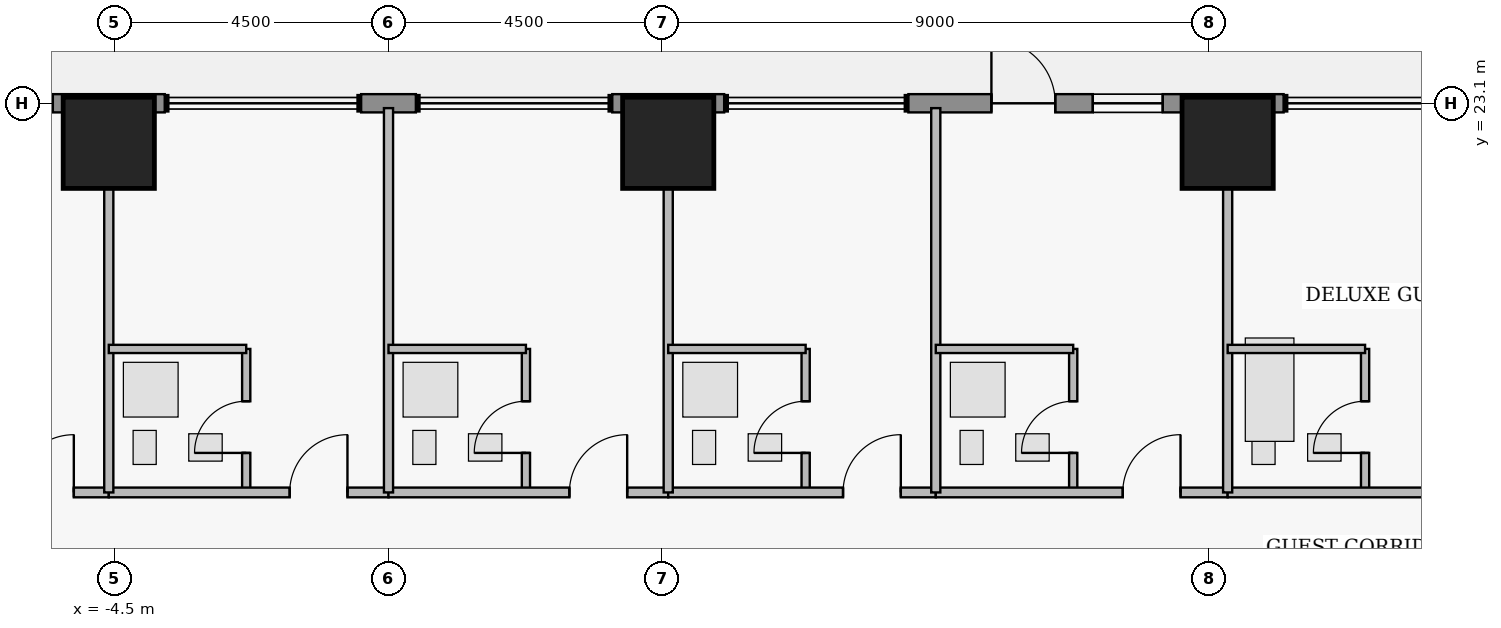
"""IFC4 building model, lengths in metres.
Left out: names, types, materials, properties, quantities, classifications, styles, units other than length and angle.
Written with IfcOpenShell. Run it as: python <this file> out.ifc"""

import sys

from ifc_helpers import new_model, si_unit, direction, frame, frame_2d, origin, origin_2d, place, context, subcontext, project, spatial, rectangle, extrude, element, fill, save


model = new_model("IFC4")
c1 = context("Model", 3, precision=1e-05, world=origin(), true_north=direction((0.0, 1.0)))
c2 = subcontext(c1, "Body", "Model", "MODEL_VIEW")
j1 = project(units=[si_unit("LENGTHUNIT", "METRE"), si_unit("PLANEANGLEUNIT", "RADIAN")], contexts=[c1])
p1 = place(None, origin())
s1 = spatial("IfcSite", under=j1, at=p1, CompositionType="ELEMENT")
p2 = place(p1, origin())
s2 = spatial("IfcBuilding", under=s1, at=p2, CompositionType="ELEMENT")
p3 = place(p2, frame((0.0, 0.0, 60.45)))
s3 = spatial("IfcBuildingStorey", under=s2, at=p3, CompositionType="ELEMENT", Elevation=60.45)
for number, where, z_axis, x_axis in (
    (1, (-4.6, 22.45, 0.0), (0.0, 0.0, 1.0), (1.0, 0.0, 0.0)),
    (2, (4.6, 22.45, 0.0), (0.0, 0.0, 1.0), (1.0, 0.0, 0.0)),
    (3, (13.8, 22.45, 0.0), (0.0, 0.0, 1.0), (1.0, 0.0, 0.0)),
):
    element("IfcColumn", number, at=place(p3, frame(where, z_axis=z_axis, x_axis=x_axis)), inside=s3, PredefinedType="COLUMN", context=c2, shape_type="SweptSolid", body=[
        extrude(rectangle(XDim=1.5, YDim=1.5, at=origin_2d()), origin(), (0.0, 0.0, 1.0), 3.65),
    ])
p4 = place(p3, frame((-5.52, 23.1, 0.0), z_axis=(0.0, 0.0, 1.0), x_axis=(1.0, 0.0, 0.0)))
e4 = element("IfcWall", 4, at=p4, inside=s3, PredefinedType="STANDARD", context=c2, shape_type="SweptSolid", body=[
    extrude(rectangle(XDim=1.84, YDim=0.3, at=frame_2d((0.92, 0.0))), origin(), (0.0, 0.0, 1.0), 3.43),
])
p5 = place(p3, frame((-0.45, 23.1, 0.0), z_axis=(0.0, 0.0, 1.0), x_axis=(1.0, 0.0, 0.0)))
e5 = element("IfcWall", 5, at=p5, inside=s3, PredefinedType="STANDARD", context=c2, shape_type="SweptSolid", body=[
    extrude(rectangle(XDim=0.9, YDim=0.3, at=frame_2d((0.45, 0.0))), origin(), (0.0, 0.0, 1.0), 3.43),
])
p6 = place(p3, frame((3.68, 23.1, 0.0), z_axis=(0.0, 0.0, 1.0), x_axis=(1.0, 0.0, 0.0)))
e6 = element("IfcWall", 6, at=p6, inside=s3, PredefinedType="STANDARD", context=c2, shape_type="SweptSolid", body=[
    extrude(rectangle(XDim=1.84, YDim=0.3, at=frame_2d((0.92, 0.0))), origin(), (0.0, 0.0, 1.0), 3.43),
])
p7 = place(p3, frame((8.55, 23.1, 0.0), z_axis=(0.0, 0.0, 1.0), x_axis=(1.0, 0.0, 0.0)))
e7 = element("IfcWall", 7, at=p7, inside=s3, PredefinedType="STANDARD", context=c2, shape_type="SweptSolid", body=[
    extrude(rectangle(XDim=6.17, YDim=0.3, at=frame_2d((3.085, 0.0))), origin(), (0.0, 0.0, 1.0), 3.43),
])
p8 = place(p7, frame((1.365, 0.0, 0.0)))
e8 = element("IfcOpeningElement", 8, at=p8, cuts=e7, PredefinedType="OPENING", context=c2, shape_type="SweptSolid", body=[
    extrude(rectangle(XDim=1.05, YDim=2.2, at=frame_2d((0.525, 1.1))), frame((0.0, 0.16, 0.0), z_axis=(0.0, -1.0, 0.0), x_axis=(1.0, 0.0, 0.0)), (0.0, 0.0, 1.0), 0.32),
])
p9 = place(p7, frame((3.032, 0.0, 0.95)))
e9 = element("IfcOpeningElement", 9, at=p9, cuts=e7, PredefinedType="OPENING", context=c2, shape_type="SweptSolid", body=[
    extrude(rectangle(XDim=1.15, YDim=1.55, at=frame_2d((0.575, 0.775))), frame((0.0, 0.16, 0.0), z_axis=(0.0, -1.0, 0.0), x_axis=(1.0, 0.0, 0.0)), (0.0, 0.0, 1.0), 0.32),
])
p10 = place(p3, frame((-9.0, 16.7, 0.0), z_axis=(0.0, 0.0, 1.0), x_axis=(1.0, 0.0, 0.0)))
e10 = element("IfcWall", 10, at=p10, inside=s3, PredefinedType="PARTITIONING", context=c2, shape_type="SweptSolid", body=[
    extrude(rectangle(XDim=4.4, YDim=0.16, at=frame_2d((2.2, 0.0))), origin(), (0.0, 0.0, 1.0), 2.973),
])
p11 = place(p10, frame((2.875, 0.0, 0.0)))
e11 = element("IfcOpeningElement", 11, at=p11, cuts=e10, PredefinedType="OPENING", context=c2, shape_type="SweptSolid", body=[
    extrude(rectangle(XDim=0.95, YDim=2.15, at=frame_2d((0.475, 1.075))), frame((0.0, 0.09, 0.0), z_axis=(0.0, -1.0, 0.0), x_axis=(1.0, 0.0, 0.0)), (0.0, 0.0, 1.0), 0.18),
])
p12 = place(p3, frame((-2.34, 16.7, 0.0), z_axis=(0.0, 0.0, 1.0), x_axis=(0.0, 1.0, 0.0)))
e12 = element("IfcWall", 12, at=p12, inside=s3, PredefinedType="PLUMBINGWALL", context=c2, shape_type="SweptSolid", body=[
    extrude(rectangle(XDim=2.36, YDim=0.135, at=frame_2d((1.18, 0.0))), origin(), (0.0, 0.0, 1.0), 3.43),
])
p13 = place(p12, frame((0.65, 0.0, 0.0)))
e13 = element("IfcOpeningElement", 13, at=p13, cuts=e12, PredefinedType="OPENING", context=c2, shape_type="SweptSolid", body=[
    extrude(rectangle(XDim=0.85, YDim=2.1, at=frame_2d((0.425, 1.05))), frame((0.0, 0.077, 0.0), z_axis=(0.0, -1.0, 0.0), x_axis=(1.0, 0.0, 0.0)), (0.0, 0.0, 1.0), 0.155),
])
p14 = place(p3, frame((-4.6, 16.7, 0.0), z_axis=(0.0, 0.0, 1.0), x_axis=(1.0, 0.0, 0.0)))
e14 = element("IfcWall", 14, at=p14, inside=s3, PredefinedType="PARTITIONING", context=c2, shape_type="SweptSolid", body=[
    extrude(rectangle(XDim=4.6, YDim=0.16, at=frame_2d((2.3, 0.0))), origin(), (0.0, 0.0, 1.0), 2.973),
])
p15 = place(p14, frame((2.975, 0.0, 0.0)))
e15 = element("IfcOpeningElement", 15, at=p15, cuts=e14, PredefinedType="OPENING", context=c2, shape_type="SweptSolid", body=[
    extrude(rectangle(XDim=0.95, YDim=2.15, at=frame_2d((0.475, 1.075))), frame((0.0, 0.09, 0.0), z_axis=(0.0, -1.0, 0.0), x_axis=(1.0, 0.0, 0.0)), (0.0, 0.0, 1.0), 0.18),
])
p16 = place(p3, frame((2.26, 16.7, 0.0), z_axis=(0.0, 0.0, 1.0), x_axis=(0.0, 1.0, 0.0)))
e16 = element("IfcWall", 16, at=p16, inside=s3, PredefinedType="PLUMBINGWALL", context=c2, shape_type="SweptSolid", body=[
    extrude(rectangle(XDim=2.36, YDim=0.135, at=frame_2d((1.18, 0.0))), origin(), (0.0, 0.0, 1.0), 3.43),
])
p17 = place(p16, frame((0.65, 0.0, 0.0)))
e17 = element("IfcOpeningElement", 17, at=p17, cuts=e16, PredefinedType="OPENING", context=c2, shape_type="SweptSolid", body=[
    extrude(rectangle(XDim=0.85, YDim=2.1, at=frame_2d((0.425, 1.05))), frame((0.0, 0.077, 0.0), z_axis=(0.0, -1.0, 0.0), x_axis=(1.0, 0.0, 0.0)), (0.0, 0.0, 1.0), 0.155),
])
p18 = place(p3, frame((0.0, 16.7, 0.0), z_axis=(0.0, 0.0, 1.0), x_axis=(1.0, 0.0, 0.0)))
e18 = element("IfcWall", 18, at=p18, inside=s3, PredefinedType="PARTITIONING", context=c2, shape_type="SweptSolid", body=[
    extrude(rectangle(XDim=4.6, YDim=0.16, at=frame_2d((2.3, 0.0))), origin(), (0.0, 0.0, 1.0), 2.973),
])
p19 = place(p18, frame((2.975, 0.0, 0.0)))
e19 = element("IfcOpeningElement", 19, at=p19, cuts=e18, PredefinedType="OPENING", context=c2, shape_type="SweptSolid", body=[
    extrude(rectangle(XDim=0.95, YDim=2.15, at=frame_2d((0.475, 1.075))), frame((0.0, 0.09, 0.0), z_axis=(0.0, -1.0, 0.0), x_axis=(1.0, 0.0, 0.0)), (0.0, 0.0, 1.0), 0.18),
])
p20 = place(p3, frame((6.86, 16.7, 0.0), z_axis=(0.0, 0.0, 1.0), x_axis=(0.0, 1.0, 0.0)))
e20 = element("IfcWall", 20, at=p20, inside=s3, PredefinedType="PLUMBINGWALL", context=c2, shape_type="SweptSolid", body=[
    extrude(rectangle(XDim=2.36, YDim=0.135, at=frame_2d((1.18, 0.0))), origin(), (0.0, 0.0, 1.0), 3.43),
])
p21 = place(p20, frame((0.65, 0.0, 0.0)))
e21 = element("IfcOpeningElement", 21, at=p21, cuts=e20, PredefinedType="OPENING", context=c2, shape_type="SweptSolid", body=[
    extrude(rectangle(XDim=0.85, YDim=2.1, at=frame_2d((0.425, 1.05))), frame((0.0, 0.077, 0.0), z_axis=(0.0, -1.0, 0.0), x_axis=(1.0, 0.0, 0.0)), (0.0, 0.0, 1.0), 0.155),
])
p22 = place(p3, frame((4.6, 16.7, 0.0), z_axis=(0.0, 0.0, 1.0), x_axis=(1.0, 0.0, 0.0)))
e22 = element("IfcWall", 22, at=p22, inside=s3, PredefinedType="PARTITIONING", context=c2, shape_type="SweptSolid", body=[
    extrude(rectangle(XDim=4.4, YDim=0.16, at=frame_2d((2.2, 0.0))), origin(), (0.0, 0.0, 1.0), 2.973),
])
p23 = place(p22, frame((2.875, 0.0, 0.0)))
e23 = element("IfcOpeningElement", 23, at=p23, cuts=e22, PredefinedType="OPENING", context=c2, shape_type="SweptSolid", body=[
    extrude(rectangle(XDim=0.95, YDim=2.15, at=frame_2d((0.475, 1.075))), frame((0.0, 0.09, 0.0), z_axis=(0.0, -1.0, 0.0), x_axis=(1.0, 0.0, 0.0)), (0.0, 0.0, 1.0), 0.18),
])
p24 = place(p3, frame((11.26, 16.7, 0.0), z_axis=(0.0, 0.0, 1.0), x_axis=(0.0, 1.0, 0.0)))
e24 = element("IfcWall", 24, at=p24, inside=s3, PredefinedType="PLUMBINGWALL", context=c2, shape_type="SweptSolid", body=[
    extrude(rectangle(XDim=2.36, YDim=0.135, at=frame_2d((1.18, 0.0))), origin(), (0.0, 0.0, 1.0), 3.43),
])
p25 = place(p24, frame((0.65, 0.0, 0.0)))
e25 = element("IfcOpeningElement", 25, at=p25, cuts=e24, PredefinedType="OPENING", context=c2, shape_type="SweptSolid", body=[
    extrude(rectangle(XDim=0.85, YDim=2.1, at=frame_2d((0.425, 1.05))), frame((0.0, 0.077, 0.0), z_axis=(0.0, -1.0, 0.0), x_axis=(1.0, 0.0, 0.0)), (0.0, 0.0, 1.0), 0.155),
])
p26 = place(p3, frame((9.0, 16.7, 0.0), z_axis=(0.0, 0.0, 1.0), x_axis=(1.0, 0.0, 0.0)))
e26 = element("IfcWall", 26, at=p26, inside=s3, PredefinedType="PARTITIONING", context=c2, shape_type="SweptSolid", body=[
    extrude(rectangle(XDim=4.8, YDim=0.16, at=frame_2d((2.4, 0.0))), origin(), (0.0, 0.0, 1.0), 2.973),
])
p27 = place(p26, frame((3.075, 0.0, 0.0)))
e27 = element("IfcOpeningElement", 27, at=p27, cuts=e26, PredefinedType="OPENING", context=c2, shape_type="SweptSolid", body=[
    extrude(rectangle(XDim=0.95, YDim=2.15, at=frame_2d((0.475, 1.075))), frame((0.0, 0.09, 0.0), z_axis=(0.0, -1.0, 0.0), x_axis=(1.0, 0.0, 0.0)), (0.0, 0.0, 1.0), 0.18),
])
p28 = place(p3, frame((16.06, 16.7, 0.0), z_axis=(0.0, 0.0, 1.0), x_axis=(0.0, 1.0, 0.0)))
e28 = element("IfcWall", 28, at=p28, inside=s3, PredefinedType="PLUMBINGWALL", context=c2, shape_type="SweptSolid", body=[
    extrude(rectangle(XDim=2.36, YDim=0.135, at=frame_2d((1.18, 0.0))), origin(), (0.0, 0.0, 1.0), 3.43),
])
p29 = place(p28, frame((0.65, 0.0, 0.0)))
e29 = element("IfcOpeningElement", 29, at=p29, cuts=e28, PredefinedType="OPENING", context=c2, shape_type="SweptSolid", body=[
    extrude(rectangle(XDim=0.85, YDim=2.1, at=frame_2d((0.425, 1.05))), frame((0.0, 0.077, 0.0), z_axis=(0.0, -1.0, 0.0), x_axis=(1.0, 0.0, 0.0)), (0.0, 0.0, 1.0), 0.155),
])
p30 = place(p3, frame((13.8, 16.7, 0.0), z_axis=(0.0, 0.0, 1.0), x_axis=(1.0, 0.0, 0.0)))
e30 = element("IfcWall", 30, at=p30, inside=s3, PredefinedType="PARTITIONING", context=c2, shape_type="SweptSolid", body=[
    extrude(rectangle(XDim=11.84, YDim=0.16, at=frame_2d((5.92, 0.0))), origin(), (0.0, 0.0, 1.0), 3.43),
])
p31 = place(p30, frame((6.57, 0.0, 0.0)))
e31 = element("IfcOpeningElement", 31, at=p31, cuts=e30, PredefinedType="OPENING", context=c2, shape_type="SweptSolid", body=[
    extrude(rectangle(XDim=1.0, YDim=2.15, at=frame_2d((0.5, 1.075))), frame((0.0, 0.09, 0.0), z_axis=(0.0, -1.0, 0.0), x_axis=(1.0, 0.0, 0.0)), (0.0, 0.0, 1.0), 0.18),
])
p32 = place(p3, frame((-4.6, 16.7, 0.0), z_axis=(0.0, 0.0, 1.0), x_axis=(0.0, 1.0, 0.0)))
e32 = element("IfcWall", 32, at=p32, inside=s3, PredefinedType="PARTITIONING", context=c2, shape_type="SweptSolid", body=[
    extrude(rectangle(XDim=6.32, YDim=0.15, at=frame_2d((3.16, 0.0))), origin(), (0.0, 0.0, 1.0), 2.668),
])
p33 = place(p3, frame((-4.6, 19.06, 0.0), z_axis=(0.0, 0.0, 1.0), x_axis=(1.0, 0.0, 0.0)))
e33 = element("IfcWall", 33, at=p33, inside=s3, PredefinedType="PLUMBINGWALL", context=c2, shape_type="SweptSolid", body=[
    extrude(rectangle(XDim=2.26, YDim=0.135, at=frame_2d((1.13, 0.0))), origin(), (0.0, 0.0, 1.0), 2.973),
])
p34 = place(p3, frame((0.0, 16.7, 0.0), z_axis=(0.0, 0.0, 1.0), x_axis=(0.0, 1.0, 0.0)))
e34 = element("IfcWall", 34, at=p34, inside=s3, PredefinedType="PARTITIONING", context=c2, shape_type="SweptSolid", body=[
    extrude(rectangle(XDim=6.32, YDim=0.15, at=frame_2d((3.16, 0.0))), origin(), (0.0, 0.0, 1.0), 3.43),
])
p35 = place(p3, frame((0.0, 19.06, 0.0), z_axis=(0.0, 0.0, 1.0), x_axis=(1.0, 0.0, 0.0)))
e35 = element("IfcWall", 35, at=p35, inside=s3, PredefinedType="PLUMBINGWALL", context=c2, shape_type="SweptSolid", body=[
    extrude(rectangle(XDim=2.26, YDim=0.135, at=frame_2d((1.13, 0.0))), origin(), (0.0, 0.0, 1.0), 2.973),
])
p36 = place(p3, frame((4.6, 16.7, 0.0), z_axis=(0.0, 0.0, 1.0), x_axis=(0.0, 1.0, 0.0)))
e36 = element("IfcWall", 36, at=p36, inside=s3, PredefinedType="PARTITIONING", context=c2, shape_type="SweptSolid", body=[
    extrude(rectangle(XDim=6.32, YDim=0.15, at=frame_2d((3.16, 0.0))), origin(), (0.0, 0.0, 1.0), 2.668),
])
p37 = place(p3, frame((4.6, 19.06, 0.0), z_axis=(0.0, 0.0, 1.0), x_axis=(1.0, 0.0, 0.0)))
e37 = element("IfcWall", 37, at=p37, inside=s3, PredefinedType="PLUMBINGWALL", context=c2, shape_type="SweptSolid", body=[
    extrude(rectangle(XDim=2.26, YDim=0.135, at=frame_2d((1.13, 0.0))), origin(), (0.0, 0.0, 1.0), 2.973),
])
p38 = place(p3, frame((9.0, 16.7, 0.0), z_axis=(0.0, 0.0, 1.0), x_axis=(0.0, 1.0, 0.0)))
e38 = element("IfcWall", 38, at=p38, inside=s3, PredefinedType="PARTITIONING", context=c2, shape_type="SweptSolid", body=[
    extrude(rectangle(XDim=6.32, YDim=0.15, at=frame_2d((3.16, 0.0))), origin(), (0.0, 0.0, 1.0), 3.43),
])
p39 = place(p3, frame((9.0, 19.06, 0.0), z_axis=(0.0, 0.0, 1.0), x_axis=(1.0, 0.0, 0.0)))
e39 = element("IfcWall", 39, at=p39, inside=s3, PredefinedType="PLUMBINGWALL", context=c2, shape_type="SweptSolid", body=[
    extrude(rectangle(XDim=2.26, YDim=0.135, at=frame_2d((1.13, 0.0))), origin(), (0.0, 0.0, 1.0), 2.973),
])
p40 = place(p3, frame((13.8, 16.7, 0.0), z_axis=(0.0, 0.0, 1.0), x_axis=(0.0, 1.0, 0.0)))
e40 = element("IfcWall", 40, at=p40, inside=s3, PredefinedType="PARTITIONING", context=c2, shape_type="SweptSolid", body=[
    extrude(rectangle(XDim=6.32, YDim=0.15, at=frame_2d((3.16, 0.0))), origin(), (0.0, 0.0, 1.0), 2.668),
])
p41 = place(p3, frame((13.8, 19.06, 0.0), z_axis=(0.0, 0.0, 1.0), x_axis=(1.0, 0.0, 0.0)))
e41 = element("IfcWall", 41, at=p41, inside=s3, PredefinedType="PLUMBINGWALL", context=c2, shape_type="SweptSolid", body=[
    extrude(rectangle(XDim=2.26, YDim=0.135, at=frame_2d((1.13, 0.0))), origin(), (0.0, 0.0, 1.0), 3.43),
])
p42 = place(p8, origin())
e42 = element("IfcDoor", 42, at=p42, inside=s3, OperationType="SINGLE_SWING_LEFT", PredefinedType="DOOR", context=c2, shape_type="SweptSolid", body=[
    extrude(rectangle(XDim=1.05, YDim=2.2, at=frame_2d((0.525, 1.1))), frame((0.0, 0.025, 0.0), z_axis=(0.0, -1.0, 0.0), x_axis=(1.0, 0.0, 0.0)), (0.0, 0.0, 1.0), 0.05),
])
fill(e8, e42)
p43 = place(p9, origin())
e43 = element("IfcWindow", 43, at=p43, inside=s3, PartitioningType="SINGLE_PANEL", PredefinedType="WINDOW", context=c2, shape_type="SweptSolid", body=[
    extrude(rectangle(XDim=1.15, YDim=1.55, at=frame_2d((0.575, 0.775))), frame((0.0, 0.03, 0.0), z_axis=(0.0, -1.0, 0.0), x_axis=(1.0, 0.0, 0.0)), (0.0, 0.0, 1.0), 0.06),
])
fill(e9, e43)
p44 = place(p11, origin())
e44 = element("IfcDoor", 44, at=p44, inside=s3, OperationType="SINGLE_SWING_RIGHT", PredefinedType="DOOR", context=c2, shape_type="SweptSolid", body=[
    extrude(rectangle(XDim=0.95, YDim=2.15, at=frame_2d((0.475, 1.075))), frame((0.0, 0.025, 0.0), z_axis=(0.0, -1.0, 0.0), x_axis=(1.0, 0.0, 0.0)), (0.0, 0.0, 1.0), 0.05),
])
fill(e11, e44)
p45 = place(p13, origin())
e45 = element("IfcDoor", 45, at=p45, inside=s3, OperationType="SINGLE_SWING_LEFT", PredefinedType="DOOR", context=c2, shape_type="SweptSolid", body=[
    extrude(rectangle(XDim=0.85, YDim=2.1, at=frame_2d((0.425, 1.05))), frame((0.0, 0.025, 0.0), z_axis=(0.0, -1.0, 0.0), x_axis=(1.0, 0.0, 0.0)), (0.0, 0.0, 1.0), 0.05),
])
fill(e13, e45)
p46 = place(p15, origin())
e46 = element("IfcDoor", 46, at=p46, inside=s3, OperationType="SINGLE_SWING_RIGHT", PredefinedType="DOOR", context=c2, shape_type="SweptSolid", body=[
    extrude(rectangle(XDim=0.95, YDim=2.15, at=frame_2d((0.475, 1.075))), frame((0.0, 0.025, 0.0), z_axis=(0.0, -1.0, 0.0), x_axis=(1.0, 0.0, 0.0)), (0.0, 0.0, 1.0), 0.05),
])
fill(e15, e46)
p47 = place(p17, origin())
e47 = element("IfcDoor", 47, at=p47, inside=s3, OperationType="SINGLE_SWING_LEFT", PredefinedType="DOOR", context=c2, shape_type="SweptSolid", body=[
    extrude(rectangle(XDim=0.85, YDim=2.1, at=frame_2d((0.425, 1.05))), frame((0.0, 0.025, 0.0), z_axis=(0.0, -1.0, 0.0), x_axis=(1.0, 0.0, 0.0)), (0.0, 0.0, 1.0), 0.05),
])
fill(e17, e47)
p48 = place(p19, origin())
e48 = element("IfcDoor", 48, at=p48, inside=s3, OperationType="SINGLE_SWING_RIGHT", PredefinedType="DOOR", context=c2, shape_type="SweptSolid", body=[
    extrude(rectangle(XDim=0.95, YDim=2.15, at=frame_2d((0.475, 1.075))), frame((0.0, 0.025, 0.0), z_axis=(0.0, -1.0, 0.0), x_axis=(1.0, 0.0, 0.0)), (0.0, 0.0, 1.0), 0.05),
])
fill(e19, e48)
p49 = place(p21, origin())
e49 = element("IfcDoor", 49, at=p49, inside=s3, OperationType="SINGLE_SWING_LEFT", PredefinedType="DOOR", context=c2, shape_type="SweptSolid", body=[
    extrude(rectangle(XDim=0.85, YDim=2.1, at=frame_2d((0.425, 1.05))), frame((0.0, 0.025, 0.0), z_axis=(0.0, -1.0, 0.0), x_axis=(1.0, 0.0, 0.0)), (0.0, 0.0, 1.0), 0.05),
])
fill(e21, e49)
p50 = place(p23, origin())
e50 = element("IfcDoor", 50, at=p50, inside=s3, OperationType="SINGLE_SWING_RIGHT", PredefinedType="DOOR", context=c2, shape_type="SweptSolid", body=[
    extrude(rectangle(XDim=0.95, YDim=2.15, at=frame_2d((0.475, 1.075))), frame((0.0, 0.025, 0.0), z_axis=(0.0, -1.0, 0.0), x_axis=(1.0, 0.0, 0.0)), (0.0, 0.0, 1.0), 0.05),
])
fill(e23, e50)
p51 = place(p25, origin())
e51 = element("IfcDoor", 51, at=p51, inside=s3, OperationType="SINGLE_SWING_LEFT", PredefinedType="DOOR", context=c2, shape_type="SweptSolid", body=[
    extrude(rectangle(XDim=0.85, YDim=2.1, at=frame_2d((0.425, 1.05))), frame((0.0, 0.025, 0.0), z_axis=(0.0, -1.0, 0.0), x_axis=(1.0, 0.0, 0.0)), (0.0, 0.0, 1.0), 0.05),
])
fill(e25, e51)
p52 = place(p27, origin())
e52 = element("IfcDoor", 52, at=p52, inside=s3, OperationType="SINGLE_SWING_RIGHT", PredefinedType="DOOR", context=c2, shape_type="SweptSolid", body=[
    extrude(rectangle(XDim=0.95, YDim=2.15, at=frame_2d((0.475, 1.075))), frame((0.0, 0.025, 0.0), z_axis=(0.0, -1.0, 0.0), x_axis=(1.0, 0.0, 0.0)), (0.0, 0.0, 1.0), 0.05),
])
fill(e27, e52)
p53 = place(p29, origin())
e53 = element("IfcDoor", 53, at=p53, inside=s3, OperationType="SINGLE_SWING_LEFT", PredefinedType="DOOR", context=c2, shape_type="SweptSolid", body=[
    extrude(rectangle(XDim=0.85, YDim=2.1, at=frame_2d((0.425, 1.05))), frame((0.0, 0.025, 0.0), z_axis=(0.0, -1.0, 0.0), x_axis=(1.0, 0.0, 0.0)), (0.0, 0.0, 1.0), 0.05),
])
fill(e29, e53)
save(model, sys.argv[1])
